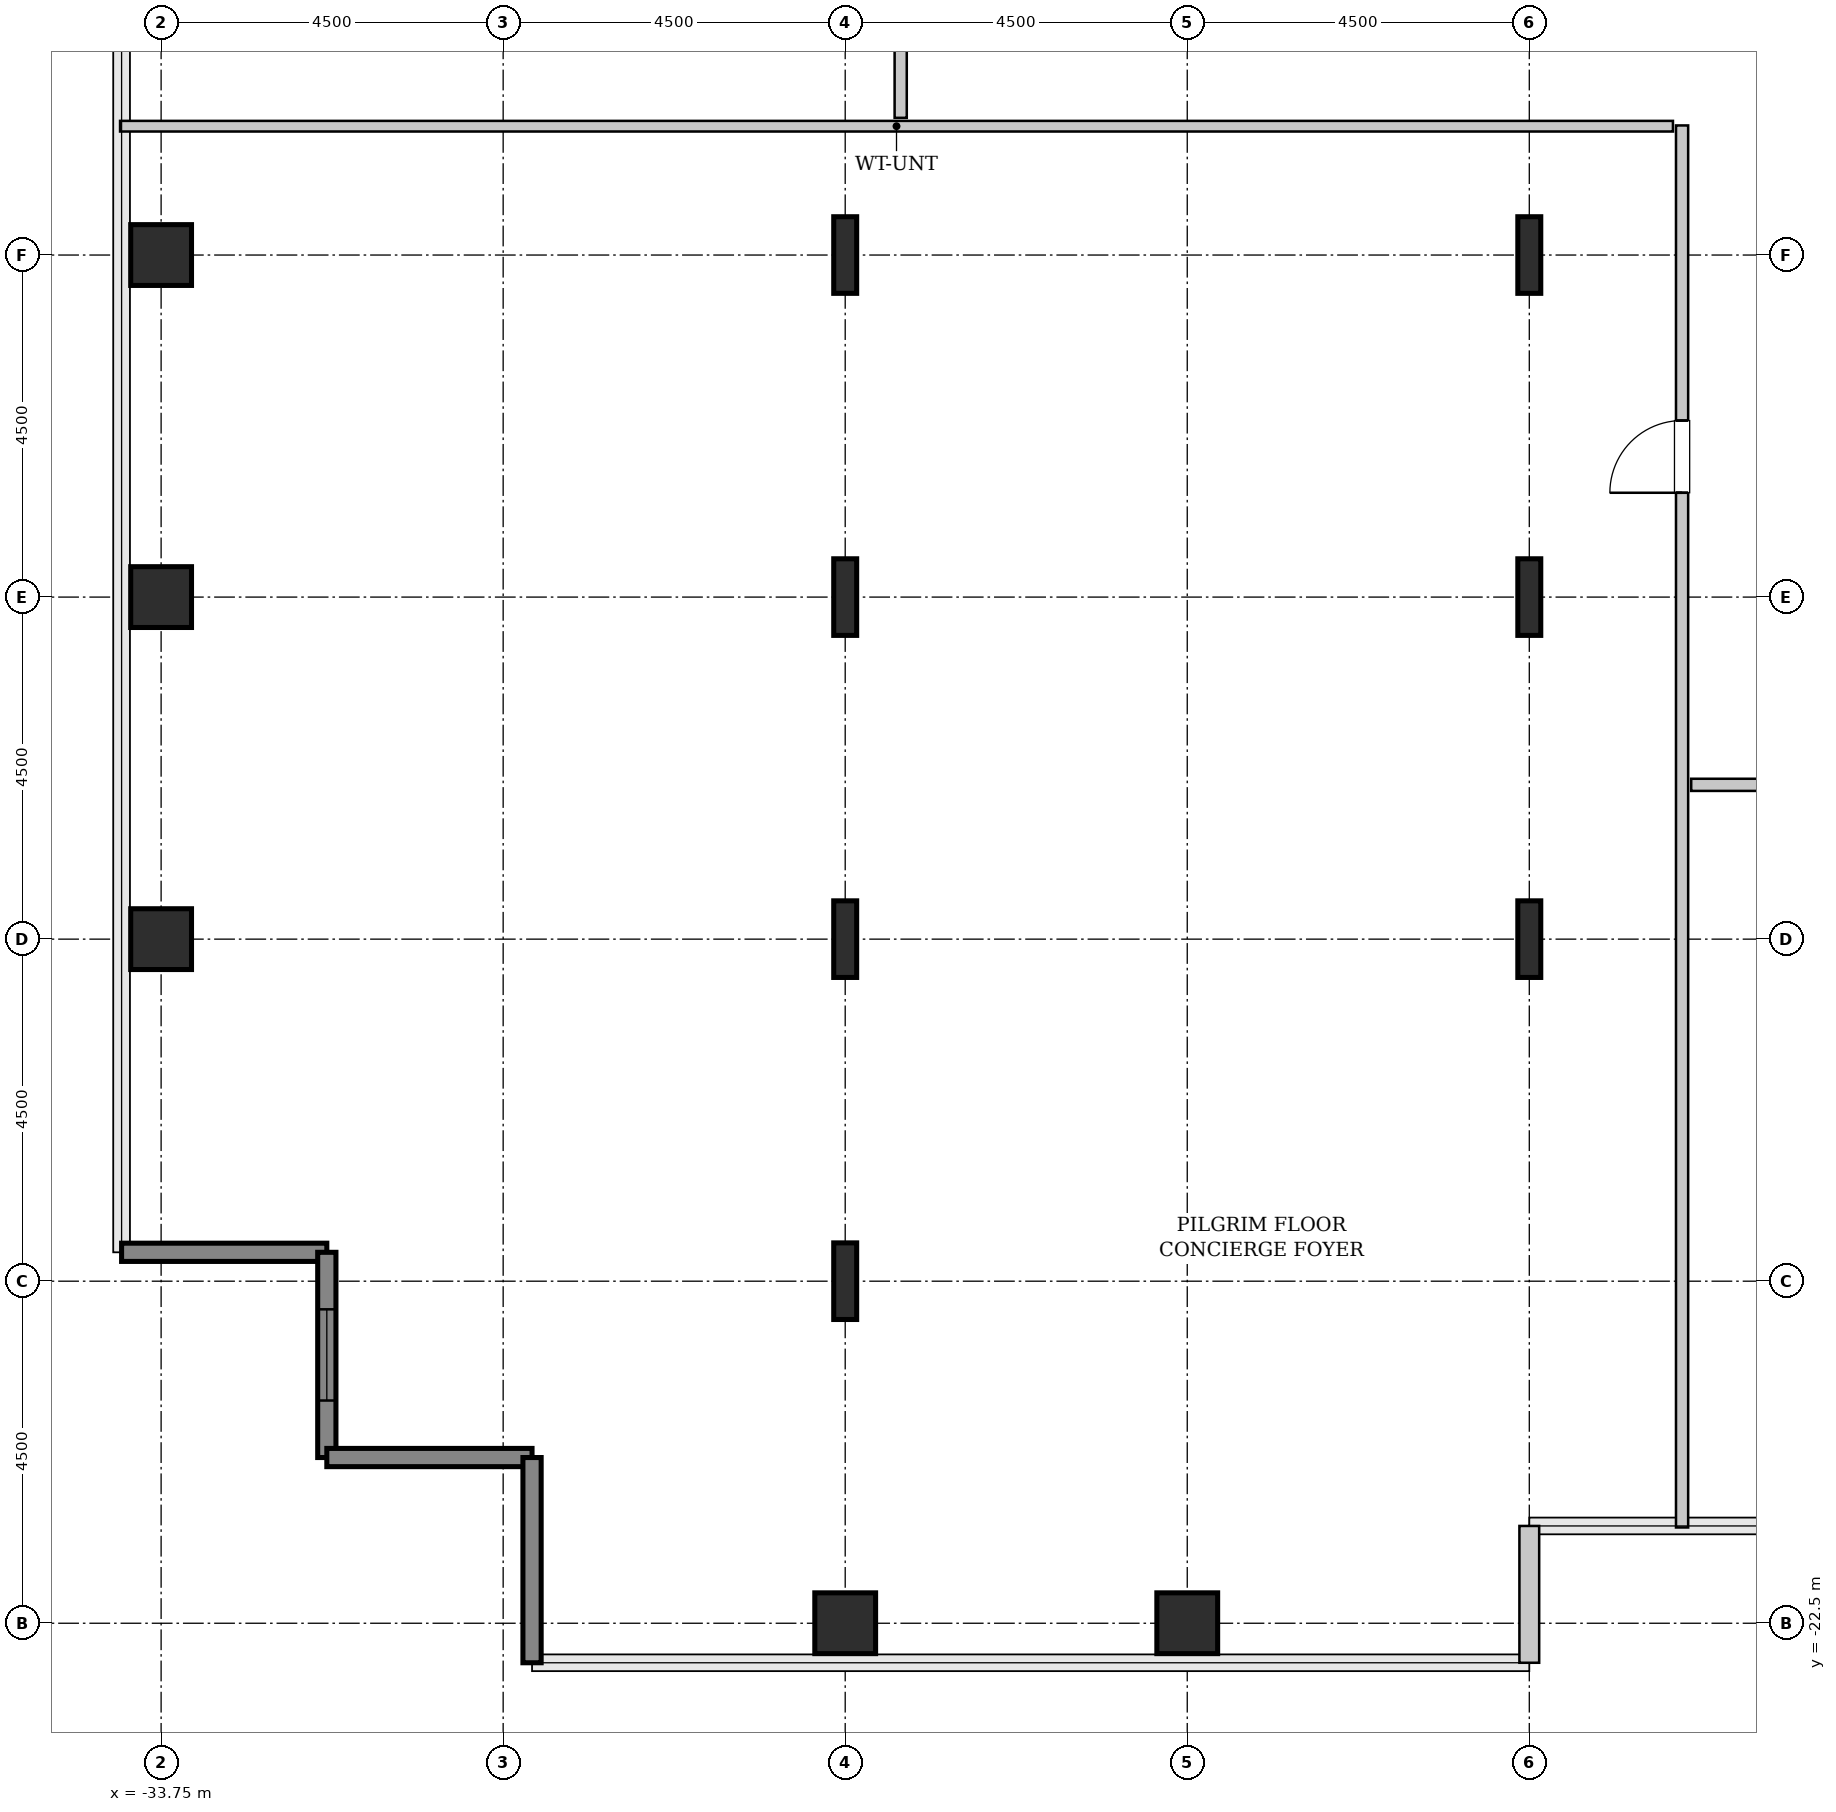
"""IFC4 building model, lengths in metres.
Left out: names, types, materials, properties, quantities, classifications, styles, units other than length and angle.
Written with IfcOpenShell. Run it as: python <this file> out.ifc"""

import sys

from ifc_helpers import new_model, si_unit, direction, frame, frame_2d, origin, origin_2d, place, context, subcontext, project, spatial, rectangle, hollow_rectangle, i_section, extrude, source, transform, mapped, element, fill, save


model = new_model("IFC4")
c1 = context("Model", 3, precision=1e-05, world=origin(), true_north=direction((0.0, 1.0)))
c2 = subcontext(c1, "Body", "Model", "MODEL_VIEW")
j1 = project(units=[si_unit("LENGTHUNIT", "METRE"), si_unit("PLANEANGLEUNIT", "RADIAN")], contexts=[c1])
p1 = place(None, origin())
s1 = spatial("IfcSite", under=j1, at=p1, CompositionType="ELEMENT")
p2 = place(p1, origin())
s2 = spatial("IfcBuilding", under=s1, at=p2, CompositionType="ELEMENT")
p3 = place(p2, frame((0.0, 0.0, 109.8)))
s3 = spatial("IfcBuildingStorey", under=s2, at=p3, CompositionType="ELEMENT", Elevation=109.8)
m1 = source(origin(), c2, "Body", "SweptSolid", [
    extrude(hollow_rectangle(XDim=0.8, YDim=0.8, WallThickness=0.04, InnerFilletRadius=0.04, OuterFilletRadius=0.08, at=origin_2d()), origin(), (0.0, 0.0, 1.0), 3.8),
])
for number, where, z_axis, x_axis in (
    (1, (-33.75, -13.5, 0.0), (0.0, 0.0, 1.0), (1.0, 0.0, 0.0)),
    (2, (-33.75, -9.0, 0.0), (0.0, 0.0, 1.0), (1.0, 0.0, 0.0)),
    (3, (-33.75, -4.5, 0.0), (0.0, 0.0, 1.0), (1.0, 0.0, 0.0)),
    (4, (-24.75, -22.5, 0.0), (0.0, 0.0, 1.0), (1.0, 0.0, 0.0)),
):
    element("IfcColumn", number, at=place(p3, frame(where, z_axis=z_axis, x_axis=x_axis)), inside=s3, PredefinedType="COLUMN", context=c2, shape_type="MappedRepresentation", body=[
        mapped(m1, transform((0.0, 0.0, 0.0), x_axis=(1.0, 0.0, 0.0), y_axis=(0.0, 1.0, 0.0), z_axis=(0.0, 0.0, 1.0), scale=1.0)),
    ])
m2 = source(origin(), c2, "Body", "SweptSolid", [
    extrude(i_section(OverallWidth=0.302, OverallDepth=1.008, WebThickness=0.021, FlangeThickness=0.04, FilletRadius=0.03, at=origin_2d()), origin(), (0.0, 0.0, 1.0), 3.8),
])
for number, where, z_axis, x_axis in (
    (5, (-24.75, -18.0, 0.0), (0.0, 0.0, 1.0), (1.0, 0.0, 0.0)),
    (6, (-24.75, -13.5, 0.0), (0.0, 0.0, 1.0), (1.0, 0.0, 0.0)),
    (7, (-24.75, -9.0, 0.0), (0.0, 0.0, 1.0), (1.0, 0.0, 0.0)),
    (8, (-24.75, -4.5, 0.0), (0.0, 0.0, 1.0), (1.0, 0.0, 0.0)),
):
    element("IfcColumn", number, at=place(p3, frame(where, z_axis=z_axis, x_axis=x_axis)), inside=s3, PredefinedType="COLUMN", context=c2, shape_type="MappedRepresentation", body=[
        mapped(m2, transform((0.0, 0.0, 0.0), x_axis=(1.0, 0.0, 0.0), y_axis=(0.0, 1.0, 0.0), z_axis=(0.0, 0.0, 1.0), scale=1.0)),
    ])
p4 = place(p3, frame((-20.25, -22.5, 0.0), z_axis=(0.0, 0.0, 1.0), x_axis=(1.0, 0.0, 0.0)))
e9 = element("IfcColumn", 9, at=p4, inside=s3, PredefinedType="COLUMN", context=c2, shape_type="MappedRepresentation", body=[
    mapped(m1, transform((0.0, 0.0, 0.0), x_axis=(1.0, 0.0, 0.0), y_axis=(0.0, 1.0, 0.0), z_axis=(0.0, 0.0, 1.0), scale=1.0)),
])
for number, where, z_axis, x_axis in (
    (10, (-15.75, -13.5, 0.0), (0.0, 0.0, 1.0), (1.0, 0.0, 0.0)),
    (11, (-15.75, -9.0, 0.0), (0.0, 0.0, 1.0), (1.0, 0.0, 0.0)),
    (12, (-15.75, -4.5, 0.0), (0.0, 0.0, 1.0), (1.0, 0.0, 0.0)),
):
    element("IfcColumn", number, at=place(p3, frame(where, z_axis=z_axis, x_axis=x_axis)), inside=s3, PredefinedType="COLUMN", context=c2, shape_type="MappedRepresentation", body=[
        mapped(m2, transform((0.0, 0.0, 0.0), x_axis=(1.0, 0.0, 0.0), y_axis=(0.0, 1.0, 0.0), z_axis=(0.0, 0.0, 1.0), scale=1.0)),
    ])
m3 = source(origin(), c2, "Body", "SweptSolid", [
    extrude(rectangle(XDim=2.7, YDim=0.24, at=frame_2d((1.35, 0.0))), origin(), (0.0, 0.0, 1.0), 3.55),
])
p5 = place(p3, frame((-34.27, -17.62, 0.0), z_axis=(0.0, 0.0, 1.0), x_axis=(1.0, 0.0, 0.0)))
e13 = element("IfcWall", 13, at=p5, inside=s3, PredefinedType="SHEAR", context=c2, shape_type="MappedRepresentation", body=[
    mapped(m3, transform((0.0, 0.0, 0.0), x_axis=(1.0, 0.0, 0.0), y_axis=(0.0, 1.0, 0.0), z_axis=(0.0, 0.0, 1.0), scale=1.0)),
])
p6 = place(p3, frame((-31.57, -17.62, 0.0), z_axis=(0.0, 0.0, 1.0), x_axis=(0.0, -1.0, 0.0)))
e14 = element("IfcWall", 14, at=p6, inside=s3, PredefinedType="SHEAR", context=c2, shape_type="MappedRepresentation", body=[
    mapped(m3, transform((0.0, 0.0, 0.0), x_axis=(1.0, 0.0, 0.0), y_axis=(0.0, 1.0, 0.0), z_axis=(0.0, 0.0, 1.0), scale=1.0)),
])
p7 = place(p6, frame((0.75, 0.0, 0.85)))
e15 = element("IfcOpeningElement", 15, at=p7, cuts=e14, PredefinedType="OPENING", context=c2, shape_type="SweptSolid", body=[
    extrude(rectangle(XDim=1.2, YDim=1.8, at=frame_2d((0.6, 0.9))), frame((0.0, 0.13, 0.0), z_axis=(0.0, -1.0, 0.0), x_axis=(1.0, 0.0, 0.0)), (0.0, 0.0, 1.0), 0.26),
])
for number, where, z_axis, x_axis in (
    (16, (-31.57, -20.32, 0.0), (0.0, 0.0, 1.0), (1.0, 0.0, 0.0)),
    (17, (-28.87, -20.32, 0.0), (0.0, 0.0, 1.0), (0.0, -1.0, 0.0)),
):
    element("IfcWall", number, at=place(p3, frame(where, z_axis=z_axis, x_axis=x_axis)), inside=s3, PredefinedType="SHEAR", context=c2, shape_type="MappedRepresentation", body=[
        mapped(m3, transform((0.0, 0.0, 0.0), x_axis=(1.0, 0.0, 0.0), y_axis=(0.0, 1.0, 0.0), z_axis=(0.0, 0.0, 1.0), scale=1.0)),
    ])
m4 = source(origin(), c2, "Body", "SweptSolid", [
    extrude(rectangle(XDim=1.8, YDim=0.26, at=frame_2d((0.9, 0.0))), origin(), (0.0, 0.0, 1.0), 3.55),
])
p8 = place(p3, frame((-15.75, -23.02, 0.0), z_axis=(0.0, 0.0, 1.0), x_axis=(0.0, 1.0, 0.0)))
e18 = element("IfcWall", 18, at=p8, inside=s3, PredefinedType="SOLIDWALL", context=c2, shape_type="MappedRepresentation", body=[
    mapped(m4, transform((0.0, 0.0, 0.0), x_axis=(1.0, 0.0, 0.0), y_axis=(0.0, 1.0, 0.0), z_axis=(0.0, 0.0, 1.0), scale=1.0)),
])
m5 = source(origin(), c2, "Body", "SweptSolid", [
    extrude(rectangle(XDim=18.445, YDim=0.16, at=frame_2d((9.223, 0.0))), origin(), (0.0, 0.0, 1.0), 3.535),
])
p9 = place(p3, frame((-13.74, -21.24, 0.0), z_axis=(0.0, 0.0, 1.0), x_axis=(0.0, 1.0, 0.0)))
e19 = element("IfcWall", 19, at=p9, inside=s3, PredefinedType="PARTITIONING", context=c2, shape_type="MappedRepresentation", body=[
    mapped(m5, transform((0.0, 0.0, 0.0), x_axis=(1.0, 0.0, 0.0), y_axis=(0.0, 1.0, 0.0), z_axis=(0.0, 0.0, 1.0), scale=1.0)),
])
p10 = place(p9, frame((13.613, 0.0, 0.0)))
e20 = element("IfcOpeningElement", 20, at=p10, cuts=e19, PredefinedType="OPENING", context=c2, shape_type="SweptSolid", body=[
    extrude(rectangle(XDim=0.95, YDim=2.1, at=frame_2d((0.475, 1.05))), frame((0.0, 0.09, 0.0), z_axis=(0.0, -1.0, 0.0), x_axis=(1.0, 0.0, 0.0)), (0.0, 0.0, 1.0), 0.18),
])
m6 = source(origin(), c2, "Body", "SweptSolid", [
    extrude(rectangle(XDim=20.43, YDim=0.14, at=frame_2d((10.215, 0.0))), origin(), (0.0, 0.0, 1.0), 3.535),
])
p11 = place(p3, frame((-34.29, -2.805, 0.0), z_axis=(0.0, 0.0, 1.0), x_axis=(1.0, 0.0, 0.0)))
e21 = element("IfcWall", 21, at=p11, inside=s3, PredefinedType="PARTITIONING", context=c2, shape_type="MappedRepresentation", body=[
    mapped(m6, transform((0.0, 0.0, 0.0), x_axis=(1.0, 0.0, 0.0), y_axis=(0.0, 1.0, 0.0), z_axis=(0.0, 0.0, 1.0), scale=1.0)),
])
m7 = source(origin(), c2, "Body", "SweptSolid", [
    extrude(rectangle(XDim=12.683, YDim=0.16, at=frame_2d((6.341, 0.0))), origin(), (0.0, 0.0, 1.0), 3.535),
])
p12 = place(p3, frame((-24.02, -2.695, 0.0), z_axis=(0.0, 0.0, 1.0), x_axis=(0.0, 1.0, 0.0)))
e22 = element("IfcWall", 22, at=p12, inside=s3, PredefinedType="PARTITIONING", context=c2, shape_type="MappedRepresentation", body=[
    mapped(m7, transform((0.0, 0.0, 0.0), x_axis=(1.0, 0.0, 0.0), y_axis=(0.0, 1.0, 0.0), z_axis=(0.0, 0.0, 1.0), scale=1.0)),
])
p13 = place(p12, frame((4.47, 0.0, 0.0)))
e23 = element("IfcOpeningElement", 23, at=p13, cuts=e22, PredefinedType="OPENING", context=c2, shape_type="SweptSolid", body=[
    extrude(rectangle(XDim=0.95, YDim=2.1, at=frame_2d((0.475, 1.05))), frame((0.0, 0.09, 0.0), z_axis=(0.0, -1.0, 0.0), x_axis=(1.0, 0.0, 0.0)), (0.0, 0.0, 1.0), 0.18),
])
m8 = source(origin(), c2, "Body", "SweptSolid", [
    extrude(rectangle(XDim=5.46, YDim=0.16, at=frame_2d((2.73, 0.0))), origin(), (0.0, 0.0, 1.0), 3.535),
])
p14 = place(p3, frame((-13.62, -11.47, 0.0), z_axis=(0.0, 0.0, 1.0), x_axis=(1.0, 0.0, 0.0)))
e24 = element("IfcWall", 24, at=p14, inside=s3, PredefinedType="PARTITIONING", context=c2, shape_type="MappedRepresentation", body=[
    mapped(m8, transform((0.0, 0.0, 0.0), x_axis=(1.0, 0.0, 0.0), y_axis=(0.0, 1.0, 0.0), z_axis=(0.0, 0.0, 1.0), scale=1.0)),
])
p15 = place(p14, frame((2.255, 0.0, 0.0)))
e25 = element("IfcOpeningElement", 25, at=p15, cuts=e24, PredefinedType="OPENING", context=c2, shape_type="SweptSolid", body=[
    extrude(rectangle(XDim=0.95, YDim=2.1, at=frame_2d((0.475, 1.05))), frame((0.0, 0.09, 0.0), z_axis=(0.0, -1.0, 0.0), x_axis=(1.0, 0.0, 0.0)), (0.0, 0.0, 1.0), 0.18),
])
m9 = source(origin(), c2, "Body", "SweptSolid", [
    extrude(rectangle(XDim=1.2, YDim=1.8, at=frame_2d((0.6, 0.9))), frame((0.0, 0.03, 0.0), z_axis=(0.0, -1.0, 0.0), x_axis=(1.0, 0.0, 0.0)), (0.0, 0.0, 1.0), 0.06),
])
p16 = place(p7, origin())
e26 = element("IfcWindow", 26, at=p16, inside=s3, PartitioningType="SINGLE_PANEL", PredefinedType="WINDOW", context=c2, shape_type="MappedRepresentation", body=[
    mapped(m9, transform((0.0, 0.0, 0.0), x_axis=(1.0, 0.0, 0.0), y_axis=(0.0, 1.0, 0.0), z_axis=(0.0, 0.0, 1.0), scale=1.0)),
])
fill(e15, e26)
m10 = source(origin(), c2, "Body", "SweptSolid", [
    extrude(rectangle(XDim=0.95, YDim=2.1, at=frame_2d((0.475, 1.05))), frame((0.0, 0.025, 0.0), z_axis=(0.0, -1.0, 0.0), x_axis=(1.0, 0.0, 0.0)), (0.0, 0.0, 1.0), 0.05),
])
p17 = place(p10, origin())
e27 = element("IfcDoor", 27, at=p17, inside=s3, OperationType="SINGLE_SWING_LEFT", PredefinedType="DOOR", context=c2, shape_type="MappedRepresentation", body=[
    mapped(m10, transform((0.0, 0.0, 0.0), x_axis=(1.0, 0.0, 0.0), y_axis=(0.0, 1.0, 0.0), z_axis=(0.0, 0.0, 1.0), scale=1.0)),
])
fill(e20, e27)
save(model, sys.argv[1])
